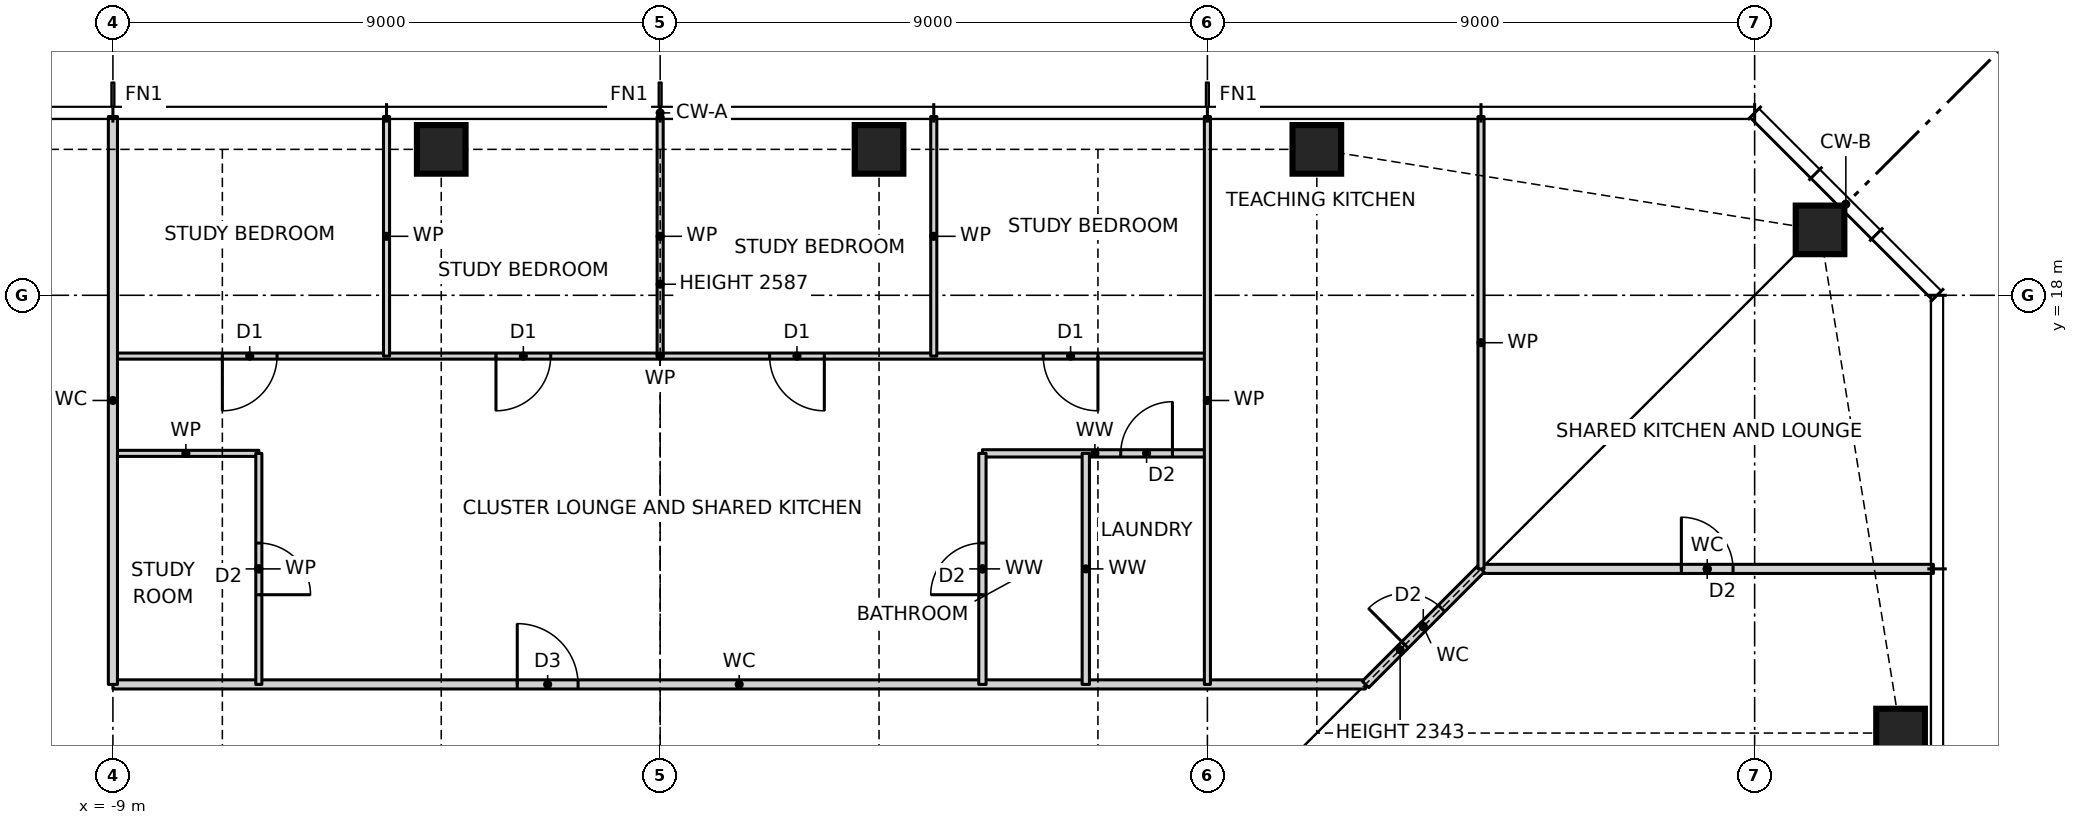
"""IFC4 building model, lengths in metres.
Left out: names, types, materials, properties, quantities, classifications, styles, units other than length and angle.
Written with IfcOpenShell. Run it as: python <this file> out.ifc"""

import sys

from ifc_helpers import new_model, si_unit, direction, frame, frame_2d, origin, origin_2d, place, context, subcontext, project, spatial, rectangle, hollow_rectangle, extrude, element, fill, save


model = new_model("IFC4")
c1 = context("Model", 3, precision=1e-05, world=origin(), true_north=direction((0.0, 1.0)))
c2 = subcontext(c1, "Body", "Model", "MODEL_VIEW")
j1 = project(units=[si_unit("LENGTHUNIT", "METRE"), si_unit("PLANEANGLEUNIT", "RADIAN")], contexts=[c1])
p1 = place(None, origin())
s1 = spatial("IfcSite", under=j1, at=p1, CompositionType="ELEMENT")
p2 = place(p1, origin())
s2 = spatial("IfcBuilding", under=s1, at=p2, CompositionType="ELEMENT")
p3 = place(p2, frame((0.0, 0.0, 126.0)))
s3 = spatial("IfcBuildingStorey", under=s2, at=p3, CompositionType="ELEMENT", Elevation=126.0)
for number, where, z_axis, x_axis in (
    (1, (20.4, 10.8, 0.0), (0.0, 0.0, 1.0), (1.0, 0.0, 0.0)),
    (2, (19.076, 19.076, 0.0), (0.0, 0.0, 1.0), (1.0, 0.0, 0.0)),
    (3, (10.8, 20.4, 0.0), (0.0, 0.0, 1.0), (1.0, 0.0, 0.0)),
    (4, (3.6, 20.4, 0.0), (0.0, 0.0, 1.0), (1.0, 0.0, 0.0)),
    (5, (-3.6, 20.4, 0.0), (0.0, 0.0, 1.0), (1.0, 0.0, 0.0)),
):
    element("IfcColumn", number, at=place(p3, frame(where, z_axis=z_axis, x_axis=x_axis)), inside=s3, PredefinedType="COLUMN", context=c2, shape_type="SweptSolid", body=[
        extrude(hollow_rectangle(XDim=0.8, YDim=0.8, WallThickness=0.07, at=origin_2d()), origin(), (0.0, 0.0, 1.0), 3.5),
    ])
p4 = place(p3, frame((-9.0, 11.6, 0.0), z_axis=(0.0, 0.0, 1.0), x_axis=(1.0, 0.0, 0.0)))
e6 = element("IfcWall", 6, at=p4, inside=s3, PredefinedType="PARTITIONING", context=c2, shape_type="SweptSolid", body=[
    extrude(rectangle(XDim=20.6, YDim=0.15, at=frame_2d((10.3, 0.0))), origin(), (0.0, 0.0, 1.0), 3.27),
])
p5 = place(p4, frame((6.65, 0.0, 0.0)))
e7 = element("IfcOpeningElement", 7, at=p5, cuts=e6, PredefinedType="OPENING", context=c2, shape_type="SweptSolid", body=[
    extrude(rectangle(XDim=1.0, YDim=2.1, at=frame_2d((0.5, 1.05))), frame((0.0, 0.085, 0.0), z_axis=(0.0, -1.0, 0.0), x_axis=(1.0, 0.0, 0.0)), (0.0, 0.0, 1.0), 0.17),
])
p6 = place(p3, frame((13.5, 13.5, 0.0), z_axis=(0.0, 0.0, 1.0), x_axis=(1.0, 0.0, 0.0)))
e8 = element("IfcWall", 8, at=p6, inside=s3, PredefinedType="PARTITIONING", context=c2, shape_type="SweptSolid", body=[
    extrude(rectangle(XDim=7.44, YDim=0.15, at=frame_2d((3.72, 0.0))), origin(), (0.0, 0.0, 1.0), 3.27),
])
p7 = place(p6, frame((3.295, 0.0, 0.0)))
e9 = element("IfcOpeningElement", 9, at=p7, cuts=e8, PredefinedType="OPENING", context=c2, shape_type="SweptSolid", body=[
    extrude(rectangle(XDim=0.85, YDim=2.1, at=frame_2d((0.425, 1.05))), frame((0.0, 0.085, 0.0), z_axis=(0.0, -1.0, 0.0), x_axis=(1.0, 0.0, 0.0)), (0.0, 0.0, 1.0), 0.17),
])
p8 = place(p3, frame((-9.0, 15.4, 0.0), z_axis=(0.0, 0.0, 1.0), x_axis=(1.0, 0.0, 0.0)))
e10 = element("IfcWall", 10, at=p8, inside=s3, PredefinedType="PARTITIONING", context=c2, shape_type="SweptSolid", body=[
    extrude(rectangle(XDim=2.4, YDim=0.1, at=frame_2d((1.2, 0.0))), origin(), (0.0, 0.0, 1.0), 3.27),
])
p9 = place(p3, frame((5.3, 15.4, 0.0), z_axis=(0.0, 0.0, 1.0), x_axis=(1.0, 0.0, 0.0)))
e11 = element("IfcWall", 11, at=p9, inside=s3, PredefinedType="PARTITIONING", context=c2, shape_type="SweptSolid", body=[
    extrude(rectangle(XDim=3.7, YDim=0.12, at=frame_2d((1.85, 0.0))), origin(), (0.0, 0.0, 1.0), 3.27),
])
p10 = place(p9, frame((2.275, 0.0, 0.0)))
e12 = element("IfcOpeningElement", 12, at=p10, cuts=e11, PredefinedType="OPENING", context=c2, shape_type="SweptSolid", body=[
    extrude(rectangle(XDim=0.85, YDim=2.1, at=frame_2d((0.425, 1.05))), frame((0.0, 0.07, 0.0), z_axis=(0.0, -1.0, 0.0), x_axis=(1.0, 0.0, 0.0)), (0.0, 0.0, 1.0), 0.14),
])
p11 = place(p3, frame((-9.0, 17.0, 0.0), z_axis=(0.0, 0.0, 1.0), x_axis=(1.0, 0.0, 0.0)))
e13 = element("IfcWall", 13, at=p11, inside=s3, PredefinedType="PARTITIONING", context=c2, shape_type="SweptSolid", body=[
    extrude(rectangle(XDim=18.0, YDim=0.1, at=frame_2d((9.0, 0.0))), origin(), (0.0, 0.0, 1.0), 3.27),
])
p12 = place(p11, frame((15.3, 0.0, 0.0)))
e14 = element("IfcOpeningElement", 14, at=p12, cuts=e13, PredefinedType="OPENING", context=c2, shape_type="SweptSolid", body=[
    extrude(rectangle(XDim=0.9, YDim=2.1, at=frame_2d((0.45, 1.05))), frame((0.0, 0.06, 0.0), z_axis=(0.0, -1.0, 0.0), x_axis=(1.0, 0.0, 0.0)), (0.0, 0.0, 1.0), 0.12),
])
p13 = place(p11, frame((10.8, 0.0, 0.0)))
e15 = element("IfcOpeningElement", 15, at=p13, cuts=e13, PredefinedType="OPENING", context=c2, shape_type="SweptSolid", body=[
    extrude(rectangle(XDim=0.9, YDim=2.1, at=frame_2d((0.45, 1.05))), frame((0.0, 0.06, 0.0), z_axis=(0.0, -1.0, 0.0), x_axis=(1.0, 0.0, 0.0)), (0.0, 0.0, 1.0), 0.12),
])
p14 = place(p11, frame((6.3, 0.0, 0.0)))
e16 = element("IfcOpeningElement", 16, at=p14, cuts=e13, PredefinedType="OPENING", context=c2, shape_type="SweptSolid", body=[
    extrude(rectangle(XDim=0.9, YDim=2.1, at=frame_2d((0.45, 1.05))), frame((0.0, 0.06, 0.0), z_axis=(0.0, -1.0, 0.0), x_axis=(1.0, 0.0, 0.0)), (0.0, 0.0, 1.0), 0.12),
])
p15 = place(p11, frame((1.8, 0.0, 0.0)))
e17 = element("IfcOpeningElement", 17, at=p15, cuts=e13, PredefinedType="OPENING", context=c2, shape_type="SweptSolid", body=[
    extrude(rectangle(XDim=0.9, YDim=2.1, at=frame_2d((0.45, 1.05))), frame((0.0, 0.06, 0.0), z_axis=(0.0, -1.0, 0.0), x_axis=(1.0, 0.0, 0.0)), (0.0, 0.0, 1.0), 0.12),
])
p16 = place(p3, frame((11.6, 11.6, 0.0), z_axis=(0.0, 0.0, 1.0), x_axis=(0.707106781187, 0.707106781187, 0.0)))
e18 = element("IfcWall", 18, at=p16, inside=s3, PredefinedType="PARTITIONING", context=c2, shape_type="SweptSolid", body=[
    extrude(rectangle(XDim=2.687, YDim=0.15, at=frame_2d((1.343, 0.0))), origin(), (0.0, 0.0, 1.0), 2.343),
])
p17 = place(p16, frame((0.919, 0.0, 0.0)))
e19 = element("IfcOpeningElement", 19, at=p17, cuts=e18, PredefinedType="OPENING", context=c2, shape_type="SweptSolid", body=[
    extrude(rectangle(XDim=0.85, YDim=2.1, at=frame_2d((0.425, 1.05))), frame((0.0, 0.085, 0.0), z_axis=(0.0, -1.0, 0.0), x_axis=(1.0, 0.0, 0.0)), (0.0, 0.0, 1.0), 0.17),
])
p18 = place(p3, frame((13.5, 13.5, 0.0), z_axis=(0.0, 0.0, 1.0), x_axis=(0.0, 1.0, 0.0)))
e20 = element("IfcWall", 20, at=p18, inside=s3, PredefinedType="PARTITIONING", context=c2, shape_type="SweptSolid", body=[
    extrude(rectangle(XDim=7.44, YDim=0.1, at=frame_2d((3.72, 0.0))), origin(), (0.0, 0.0, 1.0), 3.27),
])
p19 = place(p3, frame((9.0, 11.6, 0.0), z_axis=(0.0, 0.0, 1.0), x_axis=(0.0, 1.0, 0.0)))
e21 = element("IfcWall", 21, at=p19, inside=s3, PredefinedType="PARTITIONING", context=c2, shape_type="SweptSolid", body=[
    extrude(rectangle(XDim=9.34, YDim=0.1, at=frame_2d((4.67, 0.0))), origin(), (0.0, 0.0, 1.0), 3.27),
])
p20 = place(p3, frame((7.0, 11.6, 0.0), z_axis=(0.0, 0.0, 1.0), x_axis=(0.0, 1.0, 0.0)))
e22 = element("IfcWall", 22, at=p20, inside=s3, PredefinedType="PARTITIONING", context=c2, shape_type="SweptSolid", body=[
    extrude(rectangle(XDim=3.8, YDim=0.12, at=frame_2d((1.9, 0.0))), origin(), (0.0, 0.0, 1.0), 3.27),
])
p21 = place(p3, frame((5.3, 11.6, 0.0), z_axis=(0.0, 0.0, 1.0), x_axis=(0.0, 1.0, 0.0)))
e23 = element("IfcWall", 23, at=p21, inside=s3, PredefinedType="PARTITIONING", context=c2, shape_type="SweptSolid", body=[
    extrude(rectangle(XDim=3.8, YDim=0.12, at=frame_2d((1.9, 0.0))), origin(), (0.0, 0.0, 1.0), 3.27),
])
p22 = place(p21, frame((1.475, 0.0, 0.0)))
e24 = element("IfcOpeningElement", 24, at=p22, cuts=e23, PredefinedType="OPENING", context=c2, shape_type="SweptSolid", body=[
    extrude(rectangle(XDim=0.85, YDim=2.1, at=frame_2d((0.425, 1.05))), frame((0.0, 0.07, 0.0), z_axis=(0.0, -1.0, 0.0), x_axis=(1.0, 0.0, 0.0)), (0.0, 0.0, 1.0), 0.14),
])
p23 = place(p3, frame((4.5, 17.0, 0.0), z_axis=(0.0, 0.0, 1.0), x_axis=(0.0, 1.0, 0.0)))
e25 = element("IfcWall", 25, at=p23, inside=s3, PredefinedType="PARTITIONING", context=c2, shape_type="SweptSolid", body=[
    extrude(rectangle(XDim=3.94, YDim=0.1, at=frame_2d((1.97, 0.0))), origin(), (0.0, 0.0, 1.0), 3.27),
])
p24 = place(p3, frame((0.0, 17.0, 0.0), z_axis=(0.0, 0.0, 1.0), x_axis=(0.0, 1.0, 0.0)))
e26 = element("IfcWall", 26, at=p24, inside=s3, PredefinedType="PARTITIONING", context=c2, shape_type="SweptSolid", body=[
    extrude(rectangle(XDim=3.94, YDim=0.1, at=frame_2d((1.97, 0.0))), origin(), (0.0, 0.0, 1.0), 2.587),
])
p25 = place(p3, frame((-4.5, 17.0, 0.0), z_axis=(0.0, 0.0, 1.0), x_axis=(0.0, 1.0, 0.0)))
e27 = element("IfcWall", 27, at=p25, inside=s3, PredefinedType="PARTITIONING", context=c2, shape_type="SweptSolid", body=[
    extrude(rectangle(XDim=3.94, YDim=0.1, at=frame_2d((1.97, 0.0))), origin(), (0.0, 0.0, 1.0), 3.27),
])
p26 = place(p3, frame((-6.6, 11.6, 0.0), z_axis=(0.0, 0.0, 1.0), x_axis=(0.0, 1.0, 0.0)))
e28 = element("IfcWall", 28, at=p26, inside=s3, PredefinedType="PARTITIONING", context=c2, shape_type="SweptSolid", body=[
    extrude(rectangle(XDim=3.8, YDim=0.1, at=frame_2d((1.9, 0.0))), origin(), (0.0, 0.0, 1.0), 3.27),
])
p27 = place(p26, frame((1.475, 0.0, 0.0)))
e29 = element("IfcOpeningElement", 29, at=p27, cuts=e28, PredefinedType="OPENING", context=c2, shape_type="SweptSolid", body=[
    extrude(rectangle(XDim=0.85, YDim=2.1, at=frame_2d((0.425, 1.05))), frame((0.0, 0.06, 0.0), z_axis=(0.0, -1.0, 0.0), x_axis=(1.0, 0.0, 0.0)), (0.0, 0.0, 1.0), 0.12),
])
p28 = place(p3, frame((-9.0, 11.6, 0.0), z_axis=(0.0, 0.0, 1.0), x_axis=(0.0, 1.0, 0.0)))
e30 = element("IfcWall", 30, at=p28, inside=s3, PredefinedType="PARTITIONING", context=c2, shape_type="SweptSolid", body=[
    extrude(rectangle(XDim=9.34, YDim=0.15, at=frame_2d((4.67, 0.0))), origin(), (0.0, 0.0, 1.0), 3.27),
])
p29 = place(p17, origin())
e31 = element("IfcDoor", 31, at=p29, inside=s3, OperationType="SINGLE_SWING_LEFT", PredefinedType="DOOR", context=c2, shape_type="SweptSolid", body=[
    extrude(rectangle(XDim=0.85, YDim=2.1, at=frame_2d((0.425, 1.05))), frame((0.0, 0.025, 0.0), z_axis=(0.0, -1.0, 0.0), x_axis=(1.0, 0.0, 0.0)), (0.0, 0.0, 1.0), 0.05),
])
fill(e19, e31)
p30 = place(p12, frame((0.9, 0.0, 0.0), z_axis=(0.0, 0.0, 1.0), x_axis=(-1.0, 0.0, 0.0)))
e32 = element("IfcDoor", 32, at=p30, inside=s3, OperationType="SINGLE_SWING_LEFT", PredefinedType="DOOR", context=c2, shape_type="SweptSolid", body=[
    extrude(rectangle(XDim=0.9, YDim=2.1, at=frame_2d((0.45, 1.05))), frame((0.0, 0.025, 0.0), z_axis=(0.0, -1.0, 0.0), x_axis=(1.0, 0.0, 0.0)), (0.0, 0.0, 1.0), 0.05),
])
fill(e14, e32)
p31 = place(p13, frame((0.9, 0.0, 0.0), z_axis=(0.0, 0.0, 1.0), x_axis=(-1.0, 0.0, 0.0)))
e33 = element("IfcDoor", 33, at=p31, inside=s3, OperationType="SINGLE_SWING_LEFT", PredefinedType="DOOR", context=c2, shape_type="SweptSolid", body=[
    extrude(rectangle(XDim=0.9, YDim=2.1, at=frame_2d((0.45, 1.05))), frame((0.0, 0.025, 0.0), z_axis=(0.0, -1.0, 0.0), x_axis=(1.0, 0.0, 0.0)), (0.0, 0.0, 1.0), 0.05),
])
fill(e15, e33)
p32 = place(p14, frame((0.9, 0.0, 0.0), z_axis=(0.0, 0.0, 1.0), x_axis=(-1.0, 0.0, 0.0)))
e34 = element("IfcDoor", 34, at=p32, inside=s3, OperationType="SINGLE_SWING_RIGHT", PredefinedType="DOOR", context=c2, shape_type="SweptSolid", body=[
    extrude(rectangle(XDim=0.9, YDim=2.1, at=frame_2d((0.45, 1.05))), frame((0.0, 0.025, 0.0), z_axis=(0.0, -1.0, 0.0), x_axis=(1.0, 0.0, 0.0)), (0.0, 0.0, 1.0), 0.05),
])
fill(e16, e34)
p33 = place(p15, frame((0.9, 0.0, 0.0), z_axis=(0.0, 0.0, 1.0), x_axis=(-1.0, 0.0, 0.0)))
e35 = element("IfcDoor", 35, at=p33, inside=s3, OperationType="SINGLE_SWING_RIGHT", PredefinedType="DOOR", context=c2, shape_type="SweptSolid", body=[
    extrude(rectangle(XDim=0.9, YDim=2.1, at=frame_2d((0.45, 1.05))), frame((0.0, 0.025, 0.0), z_axis=(0.0, -1.0, 0.0), x_axis=(1.0, 0.0, 0.0)), (0.0, 0.0, 1.0), 0.05),
])
fill(e17, e35)
p34 = place(p5, origin())
e36 = element("IfcDoor", 36, at=p34, inside=s3, OperationType="SINGLE_SWING_LEFT", PredefinedType="DOOR", context=c2, shape_type="SweptSolid", body=[
    extrude(rectangle(XDim=1.0, YDim=2.1, at=frame_2d((0.5, 1.05))), frame((0.0, 0.025, 0.0), z_axis=(0.0, -1.0, 0.0), x_axis=(1.0, 0.0, 0.0)), (0.0, 0.0, 1.0), 0.05),
])
fill(e7, e36)
p35 = place(p10, origin())
e37 = element("IfcDoor", 37, at=p35, inside=s3, OperationType="SINGLE_SWING_RIGHT", PredefinedType="DOOR", context=c2, shape_type="SweptSolid", body=[
    extrude(rectangle(XDim=0.85, YDim=2.1, at=frame_2d((0.425, 1.05))), frame((0.0, 0.025, 0.0), z_axis=(0.0, -1.0, 0.0), x_axis=(1.0, 0.0, 0.0)), (0.0, 0.0, 1.0), 0.05),
])
fill(e12, e37)
p36 = place(p22, origin())
e38 = element("IfcDoor", 38, at=p36, inside=s3, OperationType="SINGLE_SWING_LEFT", PredefinedType="DOOR", context=c2, shape_type="SweptSolid", body=[
    extrude(rectangle(XDim=0.85, YDim=2.1, at=frame_2d((0.425, 1.05))), frame((0.0, 0.025, 0.0), z_axis=(0.0, -1.0, 0.0), x_axis=(1.0, 0.0, 0.0)), (0.0, 0.0, 1.0), 0.05),
])
fill(e24, e38)
p37 = place(p27, frame((0.85, 0.0, 0.0), z_axis=(0.0, 0.0, 1.0), x_axis=(-1.0, 0.0, 0.0)))
e39 = element("IfcDoor", 39, at=p37, inside=s3, OperationType="SINGLE_SWING_RIGHT", PredefinedType="DOOR", context=c2, shape_type="SweptSolid", body=[
    extrude(rectangle(XDim=0.85, YDim=2.1, at=frame_2d((0.425, 1.05))), frame((0.0, 0.025, 0.0), z_axis=(0.0, -1.0, 0.0), x_axis=(1.0, 0.0, 0.0)), (0.0, 0.0, 1.0), 0.05),
])
fill(e29, e39)
p38 = place(p7, origin())
e40 = element("IfcDoor", 40, at=p38, inside=s3, OperationType="SINGLE_SWING_LEFT", PredefinedType="DOOR", context=c2, shape_type="SweptSolid", body=[
    extrude(rectangle(XDim=0.85, YDim=2.1, at=frame_2d((0.425, 1.05))), frame((0.0, 0.025, 0.0), z_axis=(0.0, -1.0, 0.0), x_axis=(1.0, 0.0, 0.0)), (0.0, 0.0, 1.0), 0.05),
])
fill(e9, e40)
save(model, sys.argv[1])
